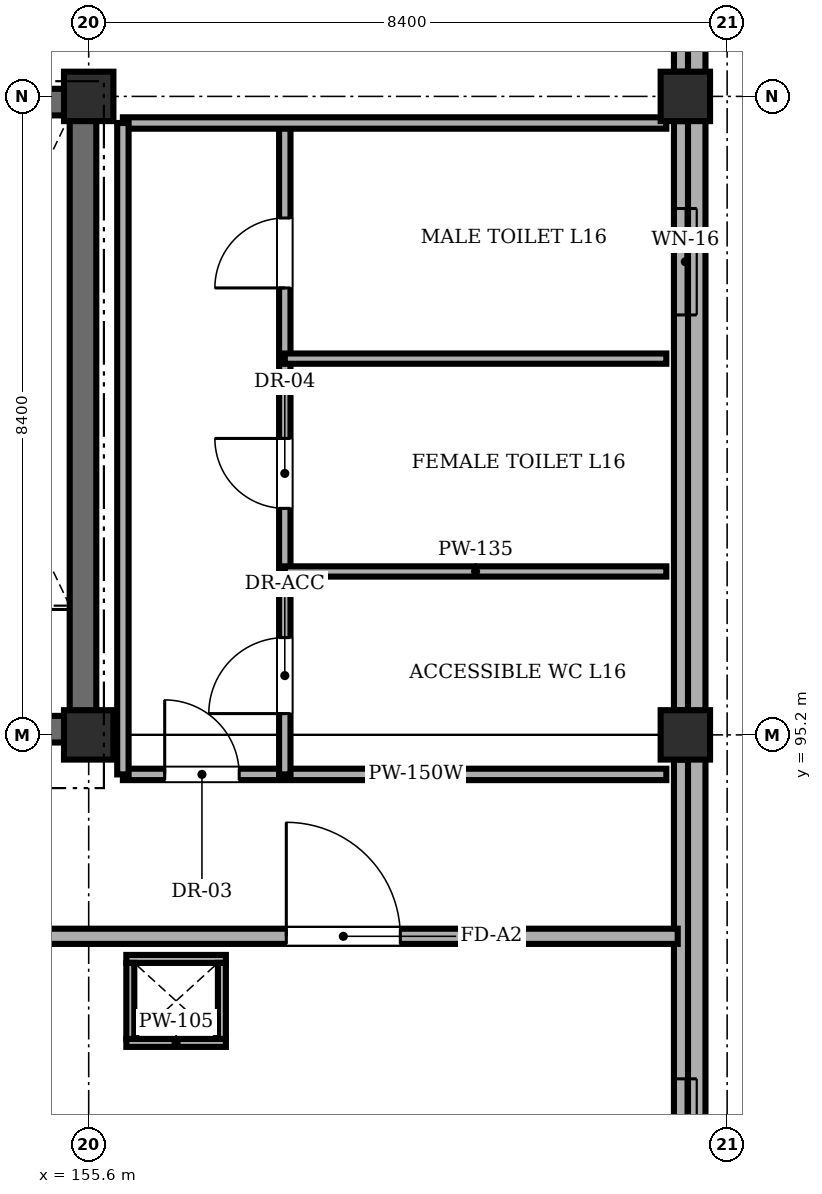
"""IFC4 building model, lengths in metres.
Left out: names, types, materials, properties, quantities, classifications, styles, units other than length and angle.
Written with IfcOpenShell. Run it as: python <this file> out.ifc"""

import sys

from ifc_helpers import new_model, si_unit, direction, frame, frame_2d, origin, origin_2d, place, context, subcontext, project, spatial, rectangle, extrude, element, fill, save


model = new_model("IFC4")
c1 = context("Model", 3, precision=1e-05, world=origin(), true_north=direction((0.0, 1.0)))
c2 = subcontext(c1, "Body", "Model", "MODEL_VIEW")
j1 = project(units=[si_unit("LENGTHUNIT", "METRE"), si_unit("PLANEANGLEUNIT", "RADIAN")], contexts=[c1])
p1 = place(None, origin())
s1 = spatial("IfcSite", under=j1, at=p1, CompositionType="ELEMENT")
p2 = place(p1, origin())
s2 = spatial("IfcBuilding", under=s1, at=p2, CompositionType="ELEMENT")
p3 = place(p2, frame((0.0, 0.0, 65.7)))
s3 = spatial("IfcBuildingStorey", under=s2, at=p3, CompositionType="ELEMENT", Elevation=65.7)
for number, where, z_axis, x_axis in (
    (1, (155.6, 95.2, 0.0), (0.0, 0.0, 1.0), (1.0, 0.0, 0.0)),
    (2, (155.6, 103.6, 0.0), (0.0, 0.0, 1.0), (1.0, 0.0, 0.0)),
    (3, (163.45, 95.2, 0.0), (0.0, 0.0, 1.0), (1.0, 0.0, 0.0)),
    (4, (163.45, 103.6, 0.0), (0.0, 0.0, 1.0), (1.0, 0.0, 0.0)),
):
    element("IfcColumn", number, at=place(p3, frame(where, z_axis=z_axis, x_axis=x_axis)), inside=s3, PredefinedType="COLUMN", context=c2, shape_type="SweptSolid", body=[
        extrude(rectangle(XDim=0.65, YDim=0.65, at=origin_2d()), origin(), (0.0, 0.0, 1.0), 4.3),
    ])
for number, where, z_axis, x_axis in (
    (5, (151.9, 95.275, 0.0), (0.0, 0.0, 1.0), (1.0, 0.0, 0.0)),
    (6, (151.9, 103.525, 0.0), (0.0, 0.0, 1.0), (1.0, 0.0, 0.0)),
):
    element("IfcWall", number, at=place(p3, frame(where, z_axis=z_axis, x_axis=x_axis)), inside=s3, PredefinedType="SHEAR", context=c2, shape_type="SweptSolid", body=[
        extrude(rectangle(XDim=3.8, YDim=0.35, at=frame_2d((1.9, 0.0))), origin(), (0.0, 0.0, 1.0), 4.3),
    ])
p4 = place(p3, frame((155.525, 95.45, 0.0), z_axis=(0.0, 0.0, 1.0), x_axis=(0.0, 1.0, 0.0)))
e7 = element("IfcWall", 7, at=p4, inside=s3, PredefinedType="SHEAR", context=c2, shape_type="SweptSolid", body=[
    extrude(rectangle(XDim=7.9, YDim=0.35, at=frame_2d((3.95, 0.0))), origin(), (0.0, 0.0, 1.0), 4.3),
])
p5 = place(p3, frame((163.45, 94.875, 0.0), z_axis=(0.0, 0.0, 1.0), x_axis=(0.0, -1.0, 0.0)))
e8 = element("IfcWall", 8, at=p5, inside=s3, PredefinedType="STANDARD", context=c2, shape_type="SweptSolid", body=[
    extrude(rectangle(XDim=7.75, YDim=0.3, at=frame_2d((3.875, 0.0))), origin(), (0.0, 0.0, 1.0), 3.7),
])
p6 = place(p5, frame((4.2, 0.0, 1.1)))
e9 = element("IfcOpeningElement", 9, at=p6, cuts=e8, PredefinedType="OPENING", context=c2, shape_type="SweptSolid", body=[
    extrude(rectangle(XDim=1.8, YDim=1.8, at=frame_2d((0.9, 0.9))), frame((0.0, 0.16, 0.0), z_axis=(0.0, -1.0, 0.0), x_axis=(1.0, 0.0, 0.0)), (0.0, 0.0, 1.0), 0.32),
])
p7 = place(p3, frame((163.45, 103.275, 0.0), z_axis=(0.0, 0.0, 1.0), x_axis=(0.0, -1.0, 0.0)))
e10 = element("IfcWall", 10, at=p7, inside=s3, PredefinedType="STANDARD", context=c2, shape_type="SweptSolid", body=[
    extrude(rectangle(XDim=7.75, YDim=0.3, at=frame_2d((3.875, 0.0))), origin(), (0.0, 0.0, 1.0), 3.7),
])
p8 = place(p7, frame((1.15, 0.0, 1.1)))
e11 = element("IfcOpeningElement", 11, at=p8, cuts=e10, PredefinedType="OPENING", context=c2, shape_type="SweptSolid", body=[
    extrude(rectangle(XDim=1.4, YDim=1.4, at=frame_2d((0.7, 0.7))), frame((0.0, 0.16, 0.0), z_axis=(0.0, -1.0, 0.0), x_axis=(1.0, 0.0, 0.0)), (0.0, 0.0, 1.0), 0.32),
])
p9 = place(p3, frame((163.45, 111.125, 0.0), z_axis=(0.0, 0.0, 1.0), x_axis=(0.0, -1.0, 0.0)))
e12 = element("IfcWall", 12, at=p9, inside=s3, PredefinedType="STANDARD", context=c2, shape_type="SweptSolid", body=[
    extrude(rectangle(XDim=7.2, YDim=0.3, at=frame_2d((3.6, 0.0))), origin(), (0.0, 0.0, 1.0), 3.7),
])
p10 = place(p9, frame((1.15, 0.0, 1.1)))
e13 = element("IfcOpeningElement", 13, at=p10, cuts=e12, PredefinedType="OPENING", context=c2, shape_type="SweptSolid", body=[
    extrude(rectangle(XDim=1.8, YDim=1.8, at=frame_2d((0.9, 0.9))), frame((0.0, 0.16, 0.0), z_axis=(0.0, -1.0, 0.0), x_axis=(1.0, 0.0, 0.0)), (0.0, 0.0, 1.0), 0.32),
])
p11 = place(p3, frame((163.6, 78.515, 4.5), z_axis=(0.0, 0.0, 1.0), x_axis=(0.0, 1.0, 0.0)))
e14 = element("IfcWall", 14, at=p11, inside=s3, PredefinedType="PARAPET", context=c2, shape_type="SweptSolid", body=[
    extrude(rectangle(XDim=32.97, YDim=0.23, at=frame_2d((16.485, 0.0))), origin(), (0.0, 0.0, 1.0), 1.35),
])
p12 = place(p3, frame((156.05, 94.68, 0.0), z_axis=(0.0, 0.0, 1.0), x_axis=(1.0, 0.0, 0.0)))
e15 = element("IfcWall", 15, at=p12, inside=s3, PredefinedType="PARTITIONING", context=c2, shape_type="SweptSolid", body=[
    extrude(rectangle(XDim=7.15, YDim=0.15, at=frame_2d((3.575, 0.0))), origin(), (0.0, 0.0, 1.0), 4.3),
])
p13 = place(p12, frame((0.55, 0.0, 0.0)))
e16 = element("IfcOpeningElement", 16, at=p13, cuts=e15, PredefinedType="OPENING", context=c2, shape_type="SweptSolid", body=[
    extrude(rectangle(XDim=0.98, YDim=2.12, at=frame_2d((0.49, 1.06))), frame((0.0, 0.085, 0.0), z_axis=(0.0, -1.0, 0.0), x_axis=(1.0, 0.0, 0.0)), (0.0, 0.0, 1.0), 0.17),
])
p14 = place(p3, frame((158.18, 94.68, 0.0), z_axis=(0.0, 0.0, 1.0), x_axis=(0.0, 1.0, 0.0)))
e17 = element("IfcWall", 17, at=p14, inside=s3, PredefinedType="PARTITIONING", context=c2, shape_type="SweptSolid", body=[
    extrude(rectangle(XDim=8.57, YDim=0.15, at=frame_2d((4.285, 0.0))), origin(), (0.0, 0.0, 1.0), 4.3),
])
p15 = place(p14, frame((0.8, 0.0, 0.0)))
e18 = element("IfcOpeningElement", 18, at=p15, cuts=e17, PredefinedType="OPENING", context=c2, shape_type="SweptSolid", body=[
    extrude(rectangle(XDim=1.0, YDim=2.12, at=frame_2d((0.5, 1.06))), frame((0.0, 0.085, 0.0), z_axis=(0.0, -1.0, 0.0), x_axis=(1.0, 0.0, 0.0)), (0.0, 0.0, 1.0), 0.17),
])
p16 = place(p14, frame((3.5, 0.0, 0.0)))
e19 = element("IfcOpeningElement", 19, at=p16, cuts=e17, PredefinedType="OPENING", context=c2, shape_type="SweptSolid", body=[
    extrude(rectangle(XDim=0.92, YDim=2.1, at=frame_2d((0.46, 1.05))), frame((0.0, 0.085, 0.0), z_axis=(0.0, -1.0, 0.0), x_axis=(1.0, 0.0, 0.0)), (0.0, 0.0, 1.0), 0.17),
])
p17 = place(p14, frame((6.4, 0.0, 0.0)))
e20 = element("IfcOpeningElement", 20, at=p17, cuts=e17, PredefinedType="OPENING", context=c2, shape_type="SweptSolid", body=[
    extrude(rectangle(XDim=0.92, YDim=2.1, at=frame_2d((0.46, 1.05))), frame((0.0, 0.085, 0.0), z_axis=(0.0, -1.0, 0.0), x_axis=(1.0, 0.0, 0.0)), (0.0, 0.0, 1.0), 0.17),
])
for number, where, z_axis, x_axis in (
    (21, (158.18, 97.35, 0.0), (0.0, 0.0, 1.0), (1.0, 0.0, 0.0)),
    (22, (158.18, 100.15, 0.0), (0.0, 0.0, 1.0), (1.0, 0.0, 0.0)),
):
    element("IfcWall", number, at=place(p3, frame(where, z_axis=z_axis, x_axis=x_axis)), inside=s3, PredefinedType="PARTITIONING", context=c2, shape_type="SweptSolid", body=[
        extrude(rectangle(XDim=5.02, YDim=0.135, at=frame_2d((2.51, 0.0))), origin(), (0.0, 0.0, 1.0), 4.3),
    ])
p18 = place(p3, frame((156.05, 103.25, 0.0), z_axis=(0.0, 0.0, 1.0), x_axis=(1.0, 0.0, 0.0)))
e23 = element("IfcWall", 23, at=p18, inside=s3, PredefinedType="PARTITIONING", context=c2, shape_type="SweptSolid", body=[
    extrude(rectangle(XDim=7.15, YDim=0.15, at=frame_2d((3.575, 0.0))), origin(), (0.0, 0.0, 1.0), 4.3),
])
p19 = place(p3, frame((156.05, 94.68, 0.0), z_axis=(0.0, 0.0, 1.0), x_axis=(0.0, 1.0, 0.0)))
e24 = element("IfcWall", 24, at=p19, inside=s3, PredefinedType="PARTITIONING", context=c2, shape_type="SweptSolid", body=[
    extrude(rectangle(XDim=8.57, YDim=0.15, at=frame_2d((4.285, 0.0))), origin(), (0.0, 0.0, 1.0), 4.3),
])
p20 = place(p3, frame((151.4, 92.55, 0.0), z_axis=(0.0, 0.0, 1.0), x_axis=(1.0, 0.0, 0.0)))
e25 = element("IfcWall", 25, at=p20, inside=s3, PredefinedType="SOLIDWALL", context=c2, shape_type="SweptSolid", body=[
    extrude(rectangle(XDim=11.95, YDim=0.2, at=frame_2d((5.975, 0.0))), origin(), (0.0, 0.0, 1.0), 4.3),
])
p21 = place(p20, frame((6.8, 0.0, 0.0)))
e26 = element("IfcOpeningElement", 26, at=p21, cuts=e25, PredefinedType="OPENING", context=c2, shape_type="SweptSolid", body=[
    extrude(rectangle(XDim=1.5, YDim=2.2, at=frame_2d((0.75, 1.1))), frame((0.0, 0.11, 0.0), z_axis=(0.0, -1.0, 0.0), x_axis=(1.0, 0.0, 0.0)), (0.0, 0.0, 1.0), 0.22),
])
for number, where, z_axis, x_axis in (
    (27, (156.095, 91.147, 0.0), (0.0, 0.0, 1.0), (1.0, 0.0, 0.0)),
    (28, (156.095, 92.252, 0.0), (0.0, 0.0, 1.0), (1.0, 0.0, 0.0)),
):
    element("IfcWall", number, at=place(p3, frame(where, z_axis=z_axis, x_axis=x_axis)), inside=s3, PredefinedType="PARTITIONING", context=c2, shape_type="SweptSolid", body=[
        extrude(rectangle(XDim=1.31, YDim=0.105, at=frame_2d((0.655, 0.0))), origin(), (0.0, 0.0, 1.0), 4.3),
    ])
for number, where, z_axis, x_axis in (
    (29, (156.147, 91.2, 0.0), (0.0, 0.0, 1.0), (0.0, 1.0, 0.0)),
    (30, (157.353, 91.2, 0.0), (0.0, 0.0, 1.0), (0.0, 1.0, 0.0)),
):
    element("IfcWall", number, at=place(p3, frame(where, z_axis=z_axis, x_axis=x_axis)), inside=s3, PredefinedType="PARTITIONING", context=c2, shape_type="SweptSolid", body=[
        extrude(rectangle(XDim=1.0, YDim=0.105, at=frame_2d((0.5, 0.0))), origin(), (0.0, 0.0, 1.0), 4.3),
    ])
p22 = place(p6, origin())
e31 = element("IfcWindow", 31, at=p22, inside=s3, PartitioningType="DOUBLE_PANEL_VERTICAL", PredefinedType="WINDOW", context=c2, shape_type="SweptSolid", body=[
    extrude(rectangle(XDim=1.8, YDim=1.8, at=frame_2d((0.9, 0.9))), frame((0.0, 0.03, 0.0), z_axis=(0.0, -1.0, 0.0), x_axis=(1.0, 0.0, 0.0)), (0.0, 0.0, 1.0), 0.06),
])
fill(e9, e31)
p23 = place(p8, origin())
e32 = element("IfcWindow", 32, at=p23, inside=s3, PartitioningType="SINGLE_PANEL", PredefinedType="WINDOW", context=c2, shape_type="SweptSolid", body=[
    extrude(rectangle(XDim=1.4, YDim=1.4, at=frame_2d((0.7, 0.7))), frame((0.0, 0.03, 0.0), z_axis=(0.0, -1.0, 0.0), x_axis=(1.0, 0.0, 0.0)), (0.0, 0.0, 1.0), 0.06),
])
fill(e11, e32)
p24 = place(p13, origin())
e33 = element("IfcDoor", 33, at=p24, inside=s3, OperationType="SINGLE_SWING_LEFT", PredefinedType="DOOR", context=c2, shape_type="SweptSolid", body=[
    extrude(rectangle(XDim=0.98, YDim=2.12, at=frame_2d((0.49, 1.06))), frame((0.0, 0.025, 0.0), z_axis=(0.0, -1.0, 0.0), x_axis=(1.0, 0.0, 0.0)), (0.0, 0.0, 1.0), 0.05),
])
fill(e16, e33)
p25 = place(p15, origin())
e34 = element("IfcDoor", 34, at=p25, inside=s3, OperationType="SINGLE_SWING_LEFT", PredefinedType="DOOR", context=c2, shape_type="SweptSolid", body=[
    extrude(rectangle(XDim=1.0, YDim=2.12, at=frame_2d((0.5, 1.06))), frame((0.0, 0.025, 0.0), z_axis=(0.0, -1.0, 0.0), x_axis=(1.0, 0.0, 0.0)), (0.0, 0.0, 1.0), 0.05),
])
fill(e18, e34)
p26 = place(p16, origin())
e35 = element("IfcDoor", 35, at=p26, inside=s3, OperationType="SINGLE_SWING_RIGHT", PredefinedType="DOOR", context=c2, shape_type="SweptSolid", body=[
    extrude(rectangle(XDim=0.92, YDim=2.1, at=frame_2d((0.46, 1.05))), frame((0.0, 0.025, 0.0), z_axis=(0.0, -1.0, 0.0), x_axis=(1.0, 0.0, 0.0)), (0.0, 0.0, 1.0), 0.05),
])
fill(e19, e35)
p27 = place(p17, origin())
e36 = element("IfcDoor", 36, at=p27, inside=s3, OperationType="SINGLE_SWING_LEFT", PredefinedType="DOOR", context=c2, shape_type="SweptSolid", body=[
    extrude(rectangle(XDim=0.92, YDim=2.1, at=frame_2d((0.46, 1.05))), frame((0.0, 0.025, 0.0), z_axis=(0.0, -1.0, 0.0), x_axis=(1.0, 0.0, 0.0)), (0.0, 0.0, 1.0), 0.05),
])
fill(e20, e36)
p28 = place(p21, origin())
e37 = element("IfcDoor", 37, at=p28, inside=s3, OperationType="SINGLE_SWING_LEFT", PredefinedType="DOOR", context=c2, shape_type="SweptSolid", body=[
    extrude(rectangle(XDim=1.5, YDim=2.2, at=frame_2d((0.75, 1.1))), frame((0.0, 0.025, 0.0), z_axis=(0.0, -1.0, 0.0), x_axis=(1.0, 0.0, 0.0)), (0.0, 0.0, 1.0), 0.05),
])
fill(e26, e37)
save(model, sys.argv[1])
